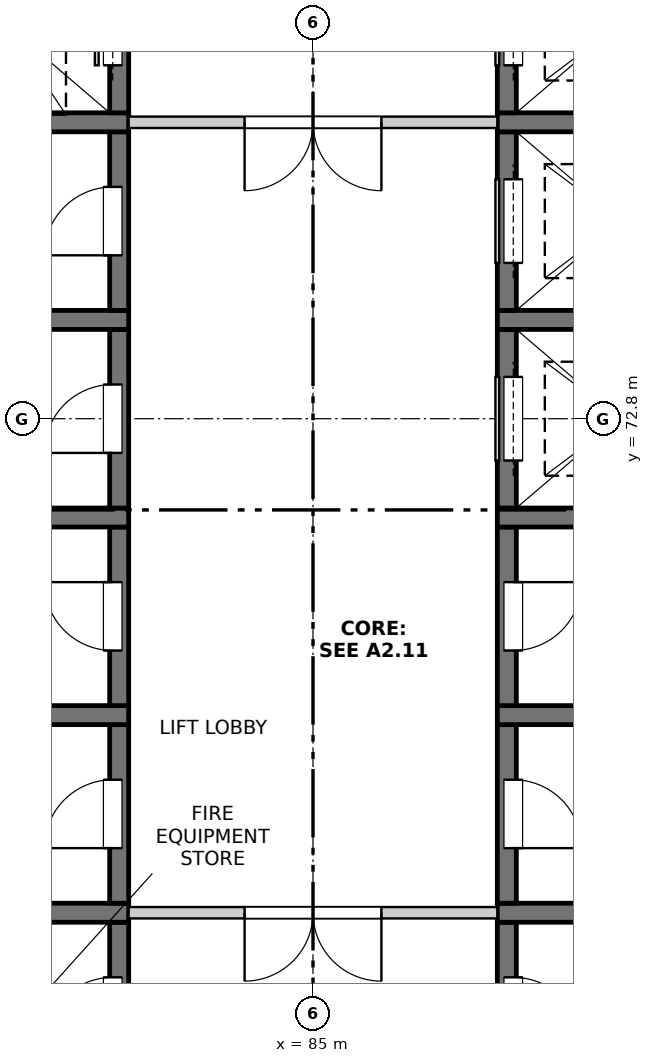
"""IFC4 building model, lengths in metres.
Left out: names, types, materials, properties, quantities, classifications, styles, units other than length and angle.
Written with IfcOpenShell. Run it as: python <this file> out.ifc"""

import sys

from ifc_helpers import new_model, si_unit, direction, frame, frame_2d, origin, place, context, subcontext, project, spatial, rectangle, extrude, element, fill, save


model = new_model("IFC4")
c1 = context("Model", 3, precision=1e-05, world=origin(), true_north=direction((0.0, 1.0)))
c2 = subcontext(c1, "Body", "Model", "MODEL_VIEW")
j1 = project(units=[si_unit("LENGTHUNIT", "METRE"), si_unit("PLANEANGLEUNIT", "RADIAN")], contexts=[c1])
p1 = place(None, origin())
s1 = spatial("IfcSite", under=j1, at=p1, CompositionType="ELEMENT")
p2 = place(p1, origin())
s2 = spatial("IfcBuilding", under=s1, at=p2, CompositionType="ELEMENT")
p3 = place(p2, frame((0.0, 0.0, 259.6)))
s3 = spatial("IfcBuildingStorey", under=s2, at=p3, CompositionType="ELEMENT", Elevation=259.6)
p4 = place(p3, frame((82.45, 63.825, -0.25), z_axis=(0.0, 0.0, 1.0), x_axis=(0.0, 1.0, 0.0)))
e1 = element("IfcWall", 1, at=p4, inside=s3, PredefinedType="SOLIDWALL", context=c2, shape_type="SweptSolid", body=[
    extrude(rectangle(XDim=2.35, YDim=0.25, at=frame_2d((1.175, 0.0))), origin(), (0.0, 0.0, 1.0), 3.4),
])
p5 = place(p4, frame((0.725, 0.0, 0.25)))
e2 = element("IfcOpeningElement", 2, at=p5, cuts=e1, PredefinedType="OPENING", context=c2, shape_type="SweptSolid", body=[
    extrude(rectangle(XDim=0.9, YDim=2.1, at=frame_2d((0.45, 1.05))), frame((0.0, 0.135, 0.0), z_axis=(0.0, -1.0, 0.0), x_axis=(1.0, 0.0, 0.0)), (0.0, 0.0, 1.0), 0.27),
])
p6 = place(p3, frame((79.575, 66.3, -0.25), z_axis=(0.0, 0.0, 1.0), x_axis=(1.0, 0.0, 0.0)))
e3 = element("IfcWall", 3, at=p6, inside=s3, PredefinedType="SOLIDWALL", context=c2, shape_type="SweptSolid", body=[
    extrude(rectangle(XDim=3.0, YDim=0.25, at=frame_2d((1.5, 0.0))), origin(), (0.0, 0.0, 1.0), 3.4),
])
p7 = place(p3, frame((82.45, 66.425, -0.25), z_axis=(0.0, 0.0, 1.0), x_axis=(0.0, 1.0, 0.0)))
e4 = element("IfcWall", 4, at=p7, inside=s3, PredefinedType="SOLIDWALL", context=c2, shape_type="SweptSolid", body=[
    extrude(rectangle(XDim=2.35, YDim=0.25, at=frame_2d((1.175, 0.0))), origin(), (0.0, 0.0, 1.0), 3.4),
])
p8 = place(p7, frame((0.725, 0.0, 0.25)))
e5 = element("IfcOpeningElement", 5, at=p8, cuts=e4, PredefinedType="OPENING", context=c2, shape_type="SweptSolid", body=[
    extrude(rectangle(XDim=0.9, YDim=2.1, at=frame_2d((0.45, 1.05))), frame((0.0, 0.135, 0.0), z_axis=(0.0, -1.0, 0.0), x_axis=(1.0, 0.0, 0.0)), (0.0, 0.0, 1.0), 0.27),
])
p9 = place(p3, frame((79.575, 68.9, -0.25), z_axis=(0.0, 0.0, 1.0), x_axis=(1.0, 0.0, 0.0)))
e6 = element("IfcWall", 6, at=p9, inside=s3, PredefinedType="SOLIDWALL", context=c2, shape_type="SweptSolid", body=[
    extrude(rectangle(XDim=3.0, YDim=0.25, at=frame_2d((1.5, 0.0))), origin(), (0.0, 0.0, 1.0), 3.4),
])
p10 = place(p3, frame((82.45, 69.025, -0.25), z_axis=(0.0, 0.0, 1.0), x_axis=(0.0, 1.0, 0.0)))
e7 = element("IfcWall", 7, at=p10, inside=s3, PredefinedType="SOLIDWALL", context=c2, shape_type="SweptSolid", body=[
    extrude(rectangle(XDim=2.35, YDim=0.25, at=frame_2d((1.175, 0.0))), origin(), (0.0, 0.0, 1.0), 3.4),
])
p11 = place(p10, frame((0.725, 0.0, 0.25)))
e8 = element("IfcOpeningElement", 8, at=p11, cuts=e7, PredefinedType="OPENING", context=c2, shape_type="SweptSolid", body=[
    extrude(rectangle(XDim=0.9, YDim=2.1, at=frame_2d((0.45, 1.05))), frame((0.0, 0.135, 0.0), z_axis=(0.0, -1.0, 0.0), x_axis=(1.0, 0.0, 0.0)), (0.0, 0.0, 1.0), 0.27),
])
p12 = place(p3, frame((79.575, 71.5, -0.25), z_axis=(0.0, 0.0, 1.0), x_axis=(1.0, 0.0, 0.0)))
e9 = element("IfcWall", 9, at=p12, inside=s3, PredefinedType="SOLIDWALL", context=c2, shape_type="SweptSolid", body=[
    extrude(rectangle(XDim=3.0, YDim=0.25, at=frame_2d((1.5, 0.0))), origin(), (0.0, 0.0, 1.0), 3.4),
])
p13 = place(p3, frame((82.45, 71.625, -0.25), z_axis=(0.0, 0.0, 1.0), x_axis=(0.0, 1.0, 0.0)))
e10 = element("IfcWall", 10, at=p13, inside=s3, PredefinedType="SOLIDWALL", context=c2, shape_type="SweptSolid", body=[
    extrude(rectangle(XDim=2.35, YDim=0.25, at=frame_2d((1.175, 0.0))), origin(), (0.0, 0.0, 1.0), 3.4),
])
p14 = place(p13, frame((0.725, 0.0, 0.25)))
e11 = element("IfcOpeningElement", 11, at=p14, cuts=e10, PredefinedType="OPENING", context=c2, shape_type="SweptSolid", body=[
    extrude(rectangle(XDim=0.9, YDim=2.1, at=frame_2d((0.45, 1.05))), frame((0.0, 0.135, 0.0), z_axis=(0.0, -1.0, 0.0), x_axis=(1.0, 0.0, 0.0)), (0.0, 0.0, 1.0), 0.27),
])
p15 = place(p3, frame((79.575, 74.1, -0.25), z_axis=(0.0, 0.0, 1.0), x_axis=(1.0, 0.0, 0.0)))
e12 = element("IfcWall", 12, at=p15, inside=s3, PredefinedType="SOLIDWALL", context=c2, shape_type="SweptSolid", body=[
    extrude(rectangle(XDim=3.0, YDim=0.25, at=frame_2d((1.5, 0.0))), origin(), (0.0, 0.0, 1.0), 3.4),
])
p16 = place(p3, frame((82.45, 74.225, -0.25), z_axis=(0.0, 0.0, 1.0), x_axis=(0.0, 1.0, 0.0)))
e13 = element("IfcWall", 13, at=p16, inside=s3, PredefinedType="SOLIDWALL", context=c2, shape_type="SweptSolid", body=[
    extrude(rectangle(XDim=2.35, YDim=0.25, at=frame_2d((1.175, 0.0))), origin(), (0.0, 0.0, 1.0), 3.4),
])
p17 = place(p16, frame((0.725, 0.0, 0.25)))
e14 = element("IfcOpeningElement", 14, at=p17, cuts=e13, PredefinedType="OPENING", context=c2, shape_type="SweptSolid", body=[
    extrude(rectangle(XDim=0.9, YDim=2.1, at=frame_2d((0.45, 1.05))), frame((0.0, 0.135, 0.0), z_axis=(0.0, -1.0, 0.0), x_axis=(1.0, 0.0, 0.0)), (0.0, 0.0, 1.0), 0.27),
])
p18 = place(p3, frame((79.575, 76.7, -0.25), z_axis=(0.0, 0.0, 1.0), x_axis=(1.0, 0.0, 0.0)))
e15 = element("IfcWall", 15, at=p18, inside=s3, PredefinedType="SOLIDWALL", context=c2, shape_type="SweptSolid", body=[
    extrude(rectangle(XDim=3.0, YDim=0.25, at=frame_2d((1.5, 0.0))), origin(), (0.0, 0.0, 1.0), 3.4),
])
p19 = place(p3, frame((82.45, 76.825, -0.25), z_axis=(0.0, 0.0, 1.0), x_axis=(0.0, 1.0, 0.0)))
e16 = element("IfcWall", 16, at=p19, inside=s3, PredefinedType="SOLIDWALL", context=c2, shape_type="SweptSolid", body=[
    extrude(rectangle(XDim=2.35, YDim=0.25, at=frame_2d((1.175, 0.0))), origin(), (0.0, 0.0, 1.0), 3.4),
])
p20 = place(p19, frame((0.625, 0.0, 0.25)))
e17 = element("IfcOpeningElement", 17, at=p20, cuts=e16, PredefinedType="OPENING", context=c2, shape_type="SweptSolid", body=[
    extrude(rectangle(XDim=1.1, YDim=2.1, at=frame_2d((0.55, 1.05))), frame((0.0, 0.135, 0.0), z_axis=(0.0, -1.0, 0.0), x_axis=(1.0, 0.0, 0.0)), (0.0, 0.0, 1.0), 0.27),
])
p21 = place(p3, frame((87.55, 63.825, -0.25), z_axis=(0.0, 0.0, 1.0), x_axis=(0.0, 1.0, 0.0)))
e18 = element("IfcWall", 18, at=p21, inside=s3, PredefinedType="SOLIDWALL", context=c2, shape_type="SweptSolid", body=[
    extrude(rectangle(XDim=2.35, YDim=0.25, at=frame_2d((1.175, 0.0))), origin(), (0.0, 0.0, 1.0), 3.4),
])
p22 = place(p21, frame((0.725, 0.0, 0.25)))
e19 = element("IfcOpeningElement", 19, at=p22, cuts=e18, PredefinedType="OPENING", context=c2, shape_type="SweptSolid", body=[
    extrude(rectangle(XDim=0.9, YDim=2.1, at=frame_2d((0.45, 1.05))), frame((0.0, 0.135, 0.0), z_axis=(0.0, -1.0, 0.0), x_axis=(1.0, 0.0, 0.0)), (0.0, 0.0, 1.0), 0.27),
])
p23 = place(p3, frame((87.425, 66.3, -0.25), z_axis=(0.0, 0.0, 1.0), x_axis=(1.0, 0.0, 0.0)))
e20 = element("IfcWall", 20, at=p23, inside=s3, PredefinedType="SOLIDWALL", context=c2, shape_type="SweptSolid", body=[
    extrude(rectangle(XDim=3.0, YDim=0.25, at=frame_2d((1.5, 0.0))), origin(), (0.0, 0.0, 1.0), 3.4),
])
p24 = place(p3, frame((87.55, 66.425, -0.25), z_axis=(0.0, 0.0, 1.0), x_axis=(0.0, 1.0, 0.0)))
e21 = element("IfcWall", 21, at=p24, inside=s3, PredefinedType="SOLIDWALL", context=c2, shape_type="SweptSolid", body=[
    extrude(rectangle(XDim=2.35, YDim=0.25, at=frame_2d((1.175, 0.0))), origin(), (0.0, 0.0, 1.0), 3.4),
])
p25 = place(p24, frame((0.725, 0.0, 0.25)))
e22 = element("IfcOpeningElement", 22, at=p25, cuts=e21, PredefinedType="OPENING", context=c2, shape_type="SweptSolid", body=[
    extrude(rectangle(XDim=0.9, YDim=2.1, at=frame_2d((0.45, 1.05))), frame((0.0, 0.135, 0.0), z_axis=(0.0, -1.0, 0.0), x_axis=(1.0, 0.0, 0.0)), (0.0, 0.0, 1.0), 0.27),
])
p26 = place(p3, frame((87.425, 68.9, -0.25), z_axis=(0.0, 0.0, 1.0), x_axis=(1.0, 0.0, 0.0)))
e23 = element("IfcWall", 23, at=p26, inside=s3, PredefinedType="SOLIDWALL", context=c2, shape_type="SweptSolid", body=[
    extrude(rectangle(XDim=3.0, YDim=0.25, at=frame_2d((1.5, 0.0))), origin(), (0.0, 0.0, 1.0), 3.4),
])
p27 = place(p3, frame((87.55, 69.025, -0.25), z_axis=(0.0, 0.0, 1.0), x_axis=(0.0, 1.0, 0.0)))
e24 = element("IfcWall", 24, at=p27, inside=s3, PredefinedType="SOLIDWALL", context=c2, shape_type="SweptSolid", body=[
    extrude(rectangle(XDim=2.35, YDim=0.25, at=frame_2d((1.175, 0.0))), origin(), (0.0, 0.0, 1.0), 3.4),
])
p28 = place(p27, frame((0.725, 0.0, 0.25)))
e25 = element("IfcOpeningElement", 25, at=p28, cuts=e24, PredefinedType="OPENING", context=c2, shape_type="SweptSolid", body=[
    extrude(rectangle(XDim=0.9, YDim=2.1, at=frame_2d((0.45, 1.05))), frame((0.0, 0.135, 0.0), z_axis=(0.0, -1.0, 0.0), x_axis=(1.0, 0.0, 0.0)), (0.0, 0.0, 1.0), 0.27),
])
p29 = place(p3, frame((87.425, 71.5, -0.25), z_axis=(0.0, 0.0, 1.0), x_axis=(1.0, 0.0, 0.0)))
e26 = element("IfcWall", 26, at=p29, inside=s3, PredefinedType="SOLIDWALL", context=c2, shape_type="SweptSolid", body=[
    extrude(rectangle(XDim=3.0, YDim=0.25, at=frame_2d((1.5, 0.0))), origin(), (0.0, 0.0, 1.0), 3.4),
])
p30 = place(p3, frame((87.55, 71.625, -0.25), z_axis=(0.0, 0.0, 1.0), x_axis=(0.0, 1.0, 0.0)))
e27 = element("IfcWall", 27, at=p30, inside=s3, PredefinedType="SOLIDWALL", context=c2, shape_type="SweptSolid", body=[
    extrude(rectangle(XDim=2.35, YDim=0.25, at=frame_2d((1.175, 0.0))), origin(), (0.0, 0.0, 1.0), 3.4),
])
p31 = place(p30, frame((0.625, 0.0, 0.25)))
e28 = element("IfcOpeningElement", 28, at=p31, cuts=e27, PredefinedType="OPENING", context=c2, shape_type="SweptSolid", body=[
    extrude(rectangle(XDim=1.1, YDim=2.1, at=frame_2d((0.55, 1.05))), frame((0.0, 0.135, 0.0), z_axis=(0.0, -1.0, 0.0), x_axis=(1.0, 0.0, 0.0)), (0.0, 0.0, 1.0), 0.27),
])
p32 = place(p3, frame((87.425, 74.1, -0.25), z_axis=(0.0, 0.0, 1.0), x_axis=(1.0, 0.0, 0.0)))
e29 = element("IfcWall", 29, at=p32, inside=s3, PredefinedType="SOLIDWALL", context=c2, shape_type="SweptSolid", body=[
    extrude(rectangle(XDim=3.0, YDim=0.25, at=frame_2d((1.5, 0.0))), origin(), (0.0, 0.0, 1.0), 3.4),
])
p33 = place(p3, frame((87.55, 74.225, -0.25), z_axis=(0.0, 0.0, 1.0), x_axis=(0.0, 1.0, 0.0)))
e30 = element("IfcWall", 30, at=p33, inside=s3, PredefinedType="SOLIDWALL", context=c2, shape_type="SweptSolid", body=[
    extrude(rectangle(XDim=2.35, YDim=0.25, at=frame_2d((1.175, 0.0))), origin(), (0.0, 0.0, 1.0), 3.4),
])
p34 = place(p33, frame((0.625, 0.0, 0.25)))
e31 = element("IfcOpeningElement", 31, at=p34, cuts=e30, PredefinedType="OPENING", context=c2, shape_type="SweptSolid", body=[
    extrude(rectangle(XDim=1.1, YDim=2.1, at=frame_2d((0.55, 1.05))), frame((0.0, 0.135, 0.0), z_axis=(0.0, -1.0, 0.0), x_axis=(1.0, 0.0, 0.0)), (0.0, 0.0, 1.0), 0.27),
])
p35 = place(p3, frame((87.425, 76.7, -0.25), z_axis=(0.0, 0.0, 1.0), x_axis=(1.0, 0.0, 0.0)))
e32 = element("IfcWall", 32, at=p35, inside=s3, PredefinedType="SOLIDWALL", context=c2, shape_type="SweptSolid", body=[
    extrude(rectangle(XDim=3.0, YDim=0.25, at=frame_2d((1.5, 0.0))), origin(), (0.0, 0.0, 1.0), 3.4),
])
p36 = place(p3, frame((87.55, 76.825, -0.25), z_axis=(0.0, 0.0, 1.0), x_axis=(0.0, 1.0, 0.0)))
e33 = element("IfcWall", 33, at=p36, inside=s3, PredefinedType="SOLIDWALL", context=c2, shape_type="SweptSolid", body=[
    extrude(rectangle(XDim=2.35, YDim=0.25, at=frame_2d((1.175, 0.0))), origin(), (0.0, 0.0, 1.0), 3.4),
])
p37 = place(p36, frame((0.625, 0.0, 0.25)))
e34 = element("IfcOpeningElement", 34, at=p37, cuts=e33, PredefinedType="OPENING", context=c2, shape_type="SweptSolid", body=[
    extrude(rectangle(XDim=1.1, YDim=2.1, at=frame_2d((0.55, 1.05))), frame((0.0, 0.135, 0.0), z_axis=(0.0, -1.0, 0.0), x_axis=(1.0, 0.0, 0.0)), (0.0, 0.0, 1.0), 0.27),
])
p38 = place(p3, frame((82.575, 66.3, 0.0), z_axis=(0.0, 0.0, 1.0), x_axis=(1.0, 0.0, 0.0)))
e35 = element("IfcWall", 35, at=p38, inside=s3, PredefinedType="PARTITIONING", context=c2, shape_type="SweptSolid", body=[
    extrude(rectangle(XDim=4.85, YDim=0.15, at=frame_2d((2.425, 0.0))), origin(), (0.0, 0.0, 1.0), 3.15),
])
p39 = place(p38, frame((1.525, 0.0, 0.0)))
e36 = element("IfcOpeningElement", 36, at=p39, cuts=e35, PredefinedType="OPENING", context=c2, shape_type="SweptSolid", body=[
    extrude(rectangle(XDim=1.8, YDim=2.1, at=frame_2d((0.9, 1.05))), frame((0.0, 0.085, 0.0), z_axis=(0.0, -1.0, 0.0), x_axis=(1.0, 0.0, 0.0)), (0.0, 0.0, 1.0), 0.17),
])
p40 = place(p3, frame((82.575, 76.7, 0.0), z_axis=(0.0, 0.0, 1.0), x_axis=(1.0, 0.0, 0.0)))
e37 = element("IfcWall", 37, at=p40, inside=s3, PredefinedType="PARTITIONING", context=c2, shape_type="SweptSolid", body=[
    extrude(rectangle(XDim=4.85, YDim=0.15, at=frame_2d((2.425, 0.0))), origin(), (0.0, 0.0, 1.0), 3.15),
])
p41 = place(p40, frame((1.525, 0.0, 0.0)))
e38 = element("IfcOpeningElement", 38, at=p41, cuts=e37, PredefinedType="OPENING", context=c2, shape_type="SweptSolid", body=[
    extrude(rectangle(XDim=1.8, YDim=2.1, at=frame_2d((0.9, 1.05))), frame((0.0, 0.085, 0.0), z_axis=(0.0, -1.0, 0.0), x_axis=(1.0, 0.0, 0.0)), (0.0, 0.0, 1.0), 0.17),
])
p42 = place(p5, origin())
e39 = element("IfcDoor", 39, at=p42, inside=s3, OperationType="SINGLE_SWING_LEFT", PredefinedType="DOOR", context=c2, shape_type="SweptSolid", body=[
    extrude(rectangle(XDim=0.9, YDim=2.1, at=frame_2d((0.45, 1.05))), frame((0.0, 0.11, 0.0), z_axis=(0.0, -1.0, 0.0), x_axis=(1.0, 0.0, 0.0)), (0.0, 0.0, 1.0), 0.05),
])
fill(e2, e39)
p43 = place(p22, origin())
e40 = element("IfcDoor", 40, at=p43, inside=s3, OperationType="SINGLE_SWING_RIGHT", PredefinedType="DOOR", context=c2, shape_type="SweptSolid", body=[
    extrude(rectangle(XDim=0.9, YDim=2.1, at=frame_2d((0.45, 1.05))), frame((0.0, -0.06, 0.0), z_axis=(0.0, -1.0, 0.0), x_axis=(1.0, 0.0, 0.0)), (0.0, 0.0, 1.0), 0.05),
])
fill(e19, e40)
p44 = place(p39, origin())
e41 = element("IfcDoor", 41, at=p44, inside=s3, OperationType="DOUBLE_DOOR_SINGLE_SWING", PredefinedType="DOOR", context=c2, shape_type="SweptSolid", body=[
    extrude(rectangle(XDim=1.8, YDim=2.1, at=frame_2d((0.9, 1.05))), frame((0.0, 0.025, 0.0), z_axis=(0.0, -1.0, 0.0), x_axis=(1.0, 0.0, 0.0)), (0.0, 0.0, 1.0), 0.05),
])
fill(e36, e41)
p45 = place(p8, origin())
e42 = element("IfcDoor", 42, at=p45, inside=s3, OperationType="SINGLE_SWING_LEFT", PredefinedType="DOOR", context=c2, shape_type="SweptSolid", body=[
    extrude(rectangle(XDim=0.9, YDim=2.1, at=frame_2d((0.45, 1.05))), frame((0.0, 0.11, 0.0), z_axis=(0.0, -1.0, 0.0), x_axis=(1.0, 0.0, 0.0)), (0.0, 0.0, 1.0), 0.05),
])
fill(e5, e42)
p46 = place(p25, origin())
e43 = element("IfcDoor", 43, at=p46, inside=s3, OperationType="SINGLE_SWING_RIGHT", PredefinedType="DOOR", context=c2, shape_type="SweptSolid", body=[
    extrude(rectangle(XDim=0.9, YDim=2.1, at=frame_2d((0.45, 1.05))), frame((0.0, -0.06, 0.0), z_axis=(0.0, -1.0, 0.0), x_axis=(1.0, 0.0, 0.0)), (0.0, 0.0, 1.0), 0.05),
])
fill(e22, e43)
p47 = place(p11, origin())
e44 = element("IfcDoor", 44, at=p47, inside=s3, OperationType="SINGLE_SWING_RIGHT", PredefinedType="DOOR", context=c2, shape_type="SweptSolid", body=[
    extrude(rectangle(XDim=0.9, YDim=2.1, at=frame_2d((0.45, 1.05))), frame((0.0, 0.11, 0.0), z_axis=(0.0, -1.0, 0.0), x_axis=(1.0, 0.0, 0.0)), (0.0, 0.0, 1.0), 0.05),
])
fill(e8, e44)
p48 = place(p28, origin())
e45 = element("IfcDoor", 45, at=p48, inside=s3, OperationType="SINGLE_SWING_LEFT", PredefinedType="DOOR", context=c2, shape_type="SweptSolid", body=[
    extrude(rectangle(XDim=0.9, YDim=2.1, at=frame_2d((0.45, 1.05))), frame((0.0, -0.06, 0.0), z_axis=(0.0, -1.0, 0.0), x_axis=(1.0, 0.0, 0.0)), (0.0, 0.0, 1.0), 0.05),
])
fill(e25, e45)
p49 = place(p14, origin())
e46 = element("IfcDoor", 46, at=p49, inside=s3, OperationType="SINGLE_SWING_LEFT", PredefinedType="DOOR", context=c2, shape_type="SweptSolid", body=[
    extrude(rectangle(XDim=0.9, YDim=2.1, at=frame_2d((0.45, 1.05))), frame((0.0, 0.11, 0.0), z_axis=(0.0, -1.0, 0.0), x_axis=(1.0, 0.0, 0.0)), (0.0, 0.0, 1.0), 0.05),
])
fill(e11, e46)
p50 = place(p31, origin())
e47 = element("IfcDoor", 47, at=p50, inside=s3, OperationType="SLIDING_TO_LEFT", PredefinedType="DOOR", context=c2, shape_type="SweptSolid", body=[
    extrude(rectangle(XDim=1.1, YDim=2.1, at=frame_2d((0.55, 1.05))), frame((0.0, -0.06, 0.0), z_axis=(0.0, -1.0, 0.0), x_axis=(1.0, 0.0, 0.0)), (0.0, 0.0, 1.0), 0.05),
])
fill(e28, e47)
p51 = place(p17, origin())
e48 = element("IfcDoor", 48, at=p51, inside=s3, OperationType="SINGLE_SWING_LEFT", PredefinedType="DOOR", context=c2, shape_type="SweptSolid", body=[
    extrude(rectangle(XDim=0.9, YDim=2.1, at=frame_2d((0.45, 1.05))), frame((0.0, 0.11, 0.0), z_axis=(0.0, -1.0, 0.0), x_axis=(1.0, 0.0, 0.0)), (0.0, 0.0, 1.0), 0.05),
])
fill(e14, e48)
p52 = place(p34, origin())
e49 = element("IfcDoor", 49, at=p52, inside=s3, OperationType="SLIDING_TO_LEFT", PredefinedType="DOOR", context=c2, shape_type="SweptSolid", body=[
    extrude(rectangle(XDim=1.1, YDim=2.1, at=frame_2d((0.55, 1.05))), frame((0.0, -0.06, 0.0), z_axis=(0.0, -1.0, 0.0), x_axis=(1.0, 0.0, 0.0)), (0.0, 0.0, 1.0), 0.05),
])
fill(e31, e49)
p53 = place(p41, origin())
e50 = element("IfcDoor", 50, at=p53, inside=s3, OperationType="DOUBLE_DOOR_SINGLE_SWING", PredefinedType="DOOR", context=c2, shape_type="SweptSolid", body=[
    extrude(rectangle(XDim=1.8, YDim=2.1, at=frame_2d((0.9, 1.05))), frame((0.0, 0.025, 0.0), z_axis=(0.0, -1.0, 0.0), x_axis=(1.0, 0.0, 0.0)), (0.0, 0.0, 1.0), 0.05),
])
fill(e38, e50)
p54 = place(p20, origin())
e51 = element("IfcDoor", 51, at=p54, inside=s3, OperationType="SLIDING_TO_LEFT", PredefinedType="DOOR", context=c2, shape_type="SweptSolid", body=[
    extrude(rectangle(XDim=1.1, YDim=2.1, at=frame_2d((0.55, 1.05))), frame((0.0, 0.11, 0.0), z_axis=(0.0, -1.0, 0.0), x_axis=(1.0, 0.0, 0.0)), (0.0, 0.0, 1.0), 0.05),
])
fill(e17, e51)
p55 = place(p37, origin())
e52 = element("IfcDoor", 52, at=p55, inside=s3, OperationType="SLIDING_TO_LEFT", PredefinedType="DOOR", context=c2, shape_type="SweptSolid", body=[
    extrude(rectangle(XDim=1.1, YDim=2.1, at=frame_2d((0.55, 1.05))), frame((0.0, -0.06, 0.0), z_axis=(0.0, -1.0, 0.0), x_axis=(1.0, 0.0, 0.0)), (0.0, 0.0, 1.0), 0.05),
])
fill(e34, e52)
save(model, sys.argv[1])
